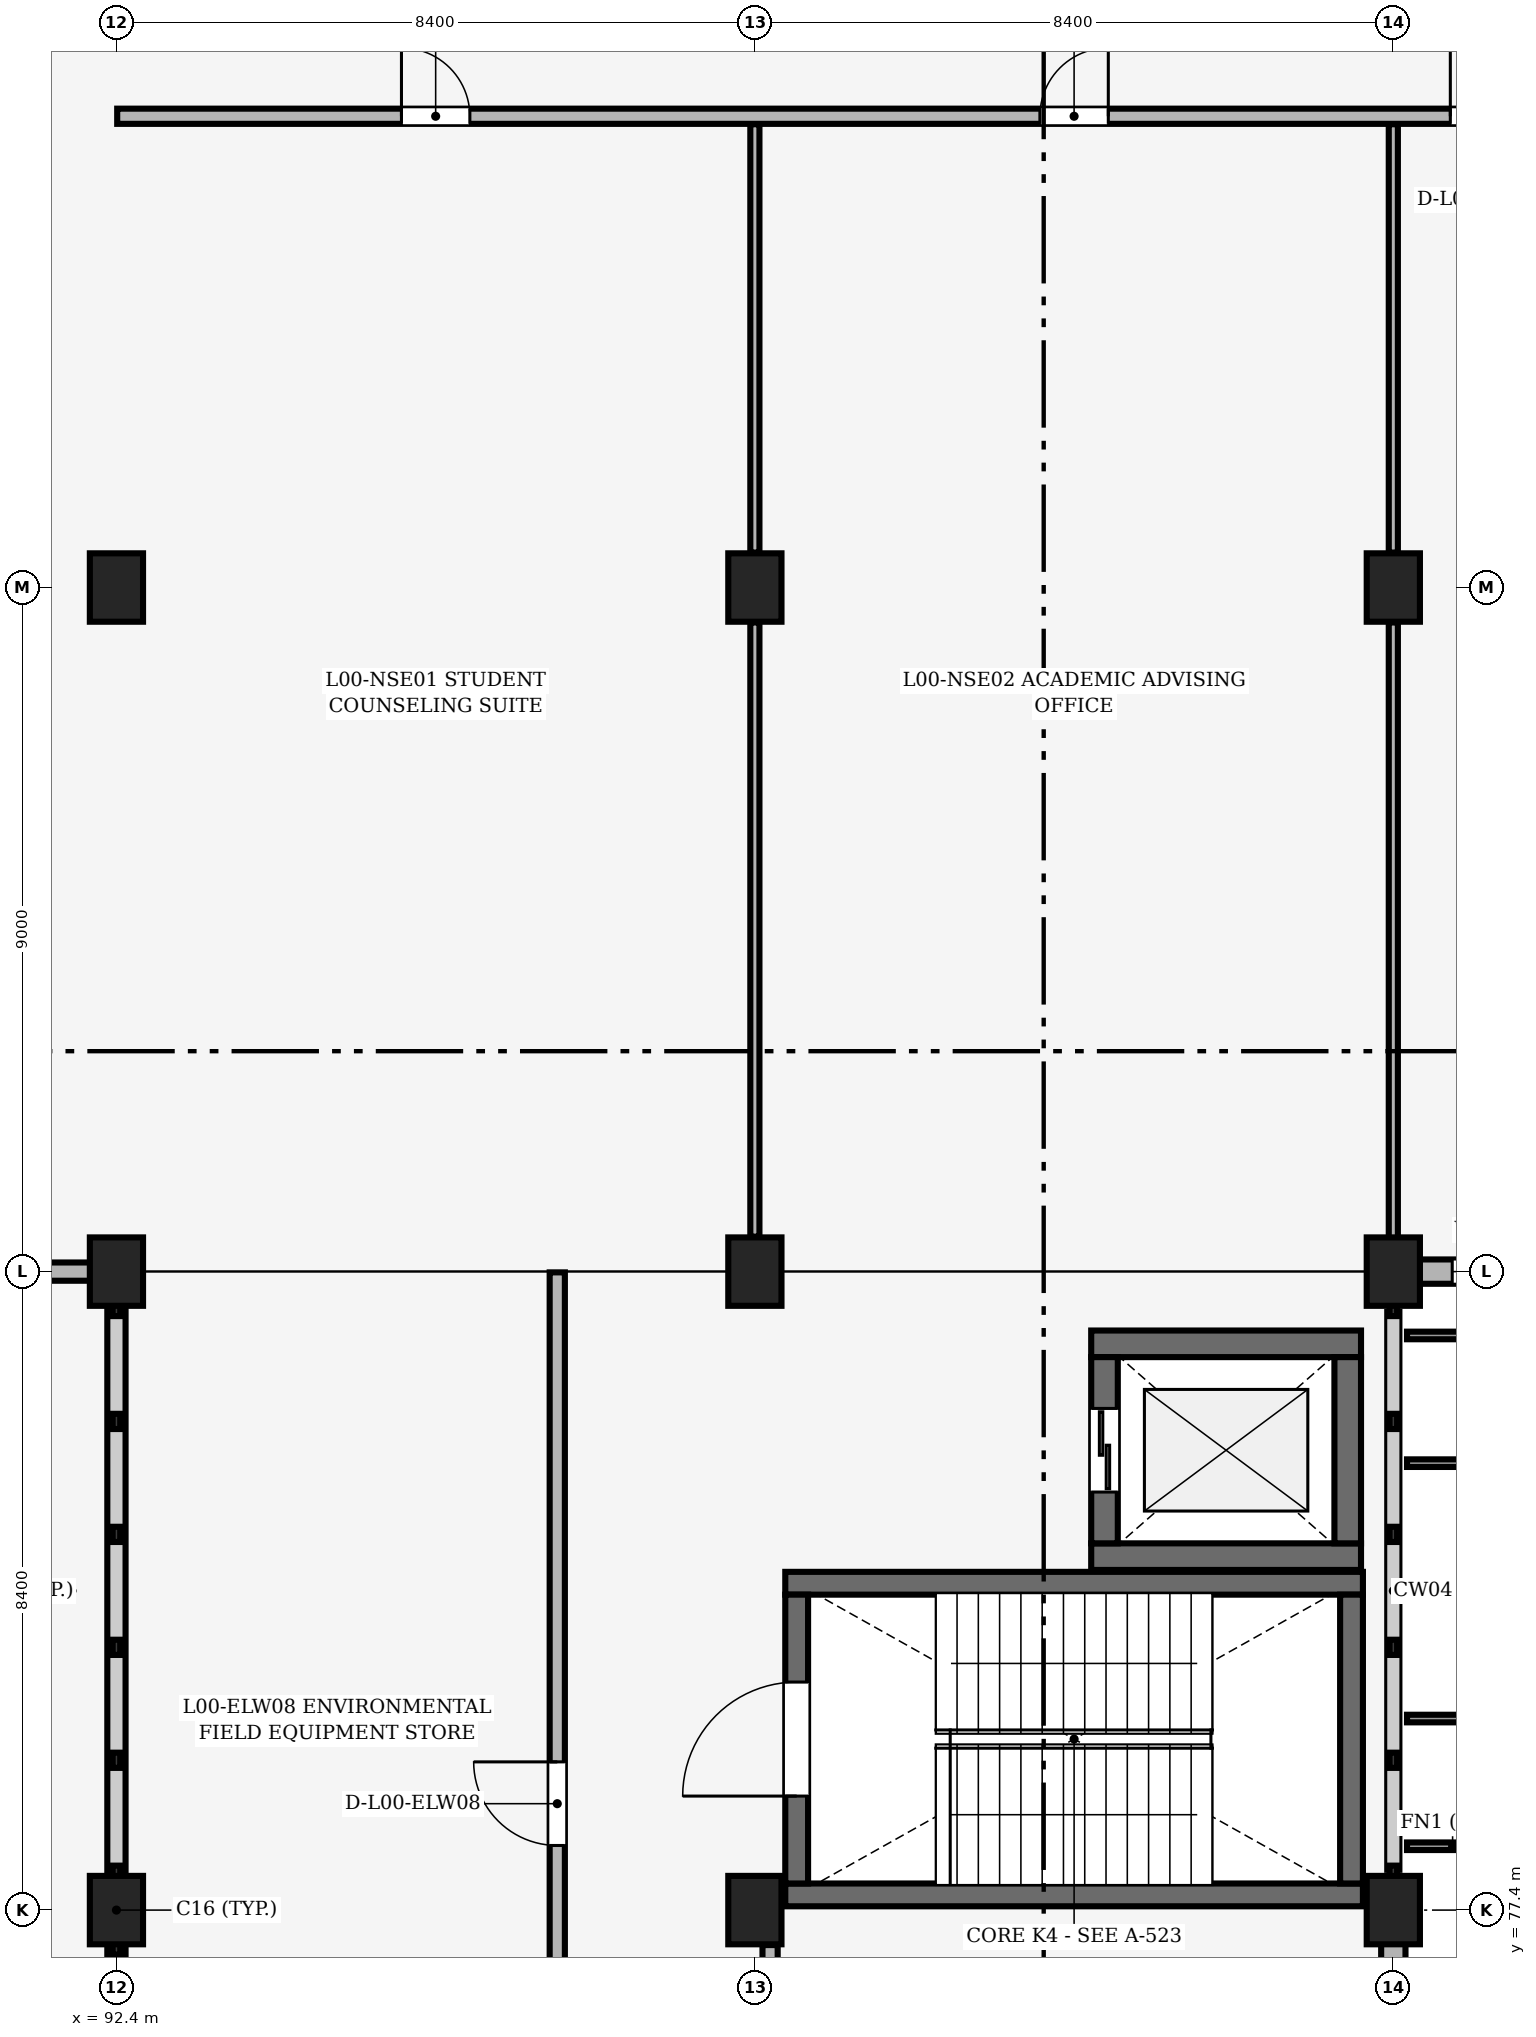
"""IFC4 building model, lengths in metres.
Left out: names, types, materials, properties, quantities, classifications, styles, units other than length and angle.
Written with IfcOpenShell. Run it as: python <this file> out.ifc"""

import sys

from ifc_helpers import new_model, si_unit, direction, frame, frame_2d, origin, origin_2d, place, context, subcontext, project, spatial, rectangle, extrude, element, fill, save


model = new_model("IFC4")
c1 = context("Model", 3, precision=1e-05, world=origin(), true_north=direction((0.0, 1.0)))
c2 = subcontext(c1, "Body", "Model", "MODEL_VIEW")
j1 = project(units=[si_unit("LENGTHUNIT", "METRE"), si_unit("PLANEANGLEUNIT", "RADIAN")], contexts=[c1])
p1 = place(None, origin())
s1 = spatial("IfcSite", under=j1, at=p1, CompositionType="ELEMENT")
p2 = place(p1, origin())
s2 = spatial("IfcBuilding", under=s1, at=p2, CompositionType="ELEMENT")
p3 = place(p2, origin())
s3 = spatial("IfcBuildingStorey", under=s2, at=p3, CompositionType="ELEMENT", Elevation=0.0)
for number, where, z_axis, x_axis in (
    (1, (92.4, 77.4, 0.0), (0.0, 0.0, 1.0), (1.0, 0.0, 0.0)),
    (2, (92.4, 85.8, 0.0), (0.0, 0.0, 1.0), (1.0, 0.0, 0.0)),
    (3, (92.4, 94.8, 0.0), (0.0, 0.0, 1.0), (1.0, 0.0, 0.0)),
    (4, (100.8, 77.4, 0.0), (0.0, 0.0, 1.0), (1.0, 0.0, 0.0)),
    (5, (100.8, 85.8, 0.0), (0.0, 0.0, 1.0), (1.0, 0.0, 0.0)),
    (6, (100.8, 94.8, 0.0), (0.0, 0.0, 1.0), (1.0, 0.0, 0.0)),
    (7, (109.2, 77.4, 0.0), (0.0, 0.0, 1.0), (1.0, 0.0, 0.0)),
    (8, (109.2, 85.8, 0.0), (0.0, 0.0, 1.0), (1.0, 0.0, 0.0)),
    (9, (109.2, 94.8, 0.0), (0.0, 0.0, 1.0), (1.0, 0.0, 0.0)),
):
    element("IfcColumn", number, at=place(p3, frame(where, z_axis=z_axis, x_axis=x_axis)), inside=s3, PredefinedType="COLUMN", context=c2, shape_type="SweptSolid", body=[
        extrude(rectangle(XDim=0.7, YDim=0.9, at=origin_2d()), origin(), (0.0, 0.0, 1.0), 4.8),
    ])
p4 = place(p3, frame((109.2, 69.425, 0.0), z_axis=(0.0, 0.0, 1.0), x_axis=(0.0, 1.0, 0.0)))
e10 = element("IfcWall", 10, at=p4, inside=s3, PredefinedType="SOLIDWALL", context=c2, shape_type="SweptSolid", body=[
    extrude(rectangle(XDim=7.55, YDim=0.32, at=frame_2d((3.775, 0.0))), origin(), (0.0, 0.0, 1.0), 3.89),
])
p5 = place(p4, frame((4.6, 0.0, 0.0), z_axis=(0.0, 0.0, 1.0), x_axis=(-1.0, 0.0, 0.0)))
e11 = element("IfcOpeningElement", 11, at=p5, cuts=e10, PredefinedType="OPENING", context=c2, shape_type="SweptSolid", body=[
    extrude(rectangle(XDim=1.65, YDim=2.25, at=frame_2d((0.825, 1.125))), frame((0.0, 0.17, 0.0), z_axis=(0.0, -1.0, 0.0), x_axis=(1.0, 0.0, 0.0)), (0.0, 0.0, 1.0), 0.34),
])
p6 = place(p4, frame((0.45, 0.0, 0.95)))
e12 = element("IfcOpeningElement", 12, at=p6, cuts=e10, PredefinedType="OPENING", context=c2, shape_type="SweptSolid", body=[
    extrude(rectangle(XDim=1.68, YDim=2.1, at=frame_2d((0.84, 1.05))), frame((0.0, 0.17, 0.0), z_axis=(0.0, -1.0, 0.0), x_axis=(1.0, 0.0, 0.0)), (0.0, 0.0, 1.0), 0.34),
])
p7 = place(p3, frame((109.525, 85.8, 0.0), z_axis=(0.0, 0.0, 1.0), x_axis=(1.0, 0.0, 0.0)))
e13 = element("IfcWall", 13, at=p7, inside=s3, PredefinedType="SOLIDWALL", context=c2, shape_type="SweptSolid", body=[
    extrude(rectangle(XDim=7.85, YDim=0.32, at=frame_2d((3.925, 0.0))), origin(), (0.0, 0.0, 1.0), 3.92),
])
p8 = place(p7, frame((0.45, 0.0, 0.9)))
e14 = element("IfcOpeningElement", 14, at=p8, cuts=e13, PredefinedType="OPENING", context=c2, shape_type="SweptSolid", body=[
    extrude(rectangle(XDim=1.68, YDim=2.4, at=frame_2d((0.84, 1.2))), frame((0.0, 0.17, 0.0), z_axis=(0.0, -1.0, 0.0), x_axis=(1.0, 0.0, 0.0)), (0.0, 0.0, 1.0), 0.34),
])
p9 = place(p7, frame((6.2, 0.0, 0.9)))
e15 = element("IfcOpeningElement", 15, at=p9, cuts=e13, PredefinedType="OPENING", context=c2, shape_type="SweptSolid", body=[
    extrude(rectangle(XDim=1.2, YDim=1.5, at=frame_2d((0.6, 0.75))), frame((0.0, 0.17, 0.0), z_axis=(0.0, -1.0, 0.0), x_axis=(1.0, 0.0, 0.0)), (0.0, 0.0, 1.0), 0.34),
])
p10 = place(p3, frame((84.229, 85.8, 0.0), z_axis=(0.0, 0.0, 1.0), x_axis=(1.0, 0.0, 0.0)))
e16 = element("IfcWall", 16, at=p10, inside=s3, PredefinedType="SOLIDWALL", context=c2, shape_type="SweptSolid", body=[
    extrude(rectangle(XDim=7.846, YDim=0.24, at=frame_2d((3.923, 0.0))), origin(), (0.0, 0.0, 1.0), 3.52),
])
p11 = place(p10, frame((4.823, 0.0, 0.0), z_axis=(0.0, 0.0, 1.0), x_axis=(-1.0, 0.0, 0.0)))
e17 = element("IfcOpeningElement", 17, at=p11, cuts=e16, PredefinedType="OPENING", context=c2, shape_type="SweptSolid", body=[
    extrude(rectangle(XDim=1.8, YDim=2.35, at=frame_2d((0.9, 1.175))), frame((0.0, 0.13, 0.0), z_axis=(0.0, -1.0, 0.0), x_axis=(1.0, 0.0, 0.0)), (0.0, 0.0, 1.0), 0.26),
])
p12 = place(p10, frame((0.45, 0.0, 0.95)))
e18 = element("IfcOpeningElement", 18, at=p12, cuts=e16, PredefinedType="OPENING", context=c2, shape_type="SweptSolid", body=[
    extrude(rectangle(XDim=1.68, YDim=1.8, at=frame_2d((0.84, 0.9))), frame((0.0, 0.13, 0.0), z_axis=(0.0, -1.0, 0.0), x_axis=(1.0, 0.0, 0.0)), (0.0, 0.0, 1.0), 0.26),
])
for number, where, z_axis, x_axis in (
    (19, (92.4, 69.425, 0.0), (0.0, 0.0, 1.0), (0.0, 1.0, 0.0)),
    (20, (92.4, 77.825, 0.0), (0.0, 0.0, 1.0), (0.0, 1.0, 0.0)),
):
    element("IfcWall", number, at=place(p3, frame(where, z_axis=z_axis, x_axis=x_axis)), inside=s3, PredefinedType="SOLIDWALL", context=c2, shape_type="SweptSolid", body=[
        extrude(rectangle(XDim=7.55, YDim=0.24, at=frame_2d((3.775, 0.0))), origin(), (0.0, 0.0, 1.0), 1.15),
    ])
for number, where, z_axis, x_axis in (
    (21, (101.2, 77.6, 0.0), (0.0, 0.0, 1.0), (1.0, 0.0, 0.0)),
    (22, (101.2, 81.7, 0.0), (0.0, 0.0, 1.0), (1.0, 0.0, 0.0)),
):
    element("IfcWall", number, at=place(p3, frame(where, z_axis=z_axis, x_axis=x_axis)), inside=s3, PredefinedType="SHEAR", context=c2, shape_type="SweptSolid", body=[
        extrude(rectangle(XDim=7.6, YDim=0.3, at=frame_2d((3.8, 0.0))), origin(), (0.0, 0.0, 1.0), 4.625),
    ])
p13 = place(p3, frame((101.35, 77.75, 0.0), z_axis=(0.0, 0.0, 1.0), x_axis=(0.0, 1.0, 0.0)))
e23 = element("IfcWall", 23, at=p13, inside=s3, PredefinedType="SHEAR", context=c2, shape_type="SweptSolid", body=[
    extrude(rectangle(XDim=3.8, YDim=0.3, at=frame_2d((1.9, 0.0))), origin(), (0.0, 0.0, 1.0), 4.625),
])
p14 = place(p13, frame((1.15, 0.0, 0.0)))
e24 = element("IfcOpeningElement", 24, at=p14, cuts=e23, PredefinedType="OPENING", context=c2, shape_type="SweptSolid", body=[
    extrude(rectangle(XDim=1.5, YDim=2.2, at=frame_2d((0.75, 1.1))), frame((0.0, 0.16, 0.0), z_axis=(0.0, -1.0, 0.0), x_axis=(1.0, 0.0, 0.0)), (0.0, 0.0, 1.0), 0.32),
])
p15 = place(p3, frame((108.65, 77.75, 0.0), z_axis=(0.0, 0.0, 1.0), x_axis=(0.0, 1.0, 0.0)))
e25 = element("IfcWall", 25, at=p15, inside=s3, PredefinedType="SHEAR", context=c2, shape_type="SweptSolid", body=[
    extrude(rectangle(XDim=3.8, YDim=0.3, at=frame_2d((1.9, 0.0))), origin(), (0.0, 0.0, 1.0), 4.625),
])
for number, where, z_axis, x_axis in (
    (26, (105.225, 82.05, 0.0), (0.0, 0.0, 1.0), (1.0, 0.0, 0.0)),
    (27, (105.225, 84.85, 0.0), (0.0, 0.0, 1.0), (1.0, 0.0, 0.0)),
):
    element("IfcWall", number, at=place(p3, frame(where, z_axis=z_axis, x_axis=x_axis)), inside=s3, PredefinedType="SHEAR", context=c2, shape_type="SweptSolid", body=[
        extrude(rectangle(XDim=3.55, YDim=0.35, at=frame_2d((1.775, 0.0))), origin(), (0.0, 0.0, 1.0), 4.52),
    ])
p16 = place(p3, frame((105.4, 82.225, 0.0), z_axis=(0.0, 0.0, 1.0), x_axis=(0.0, 1.0, 0.0)))
e28 = element("IfcWall", 28, at=p16, inside=s3, PredefinedType="SHEAR", context=c2, shape_type="SweptSolid", body=[
    extrude(rectangle(XDim=2.45, YDim=0.35, at=frame_2d((1.225, 0.0))), origin(), (0.0, 0.0, 1.0), 4.52),
])
p17 = place(p16, frame((0.675, 0.0, 0.0)))
e29 = element("IfcOpeningElement", 29, at=p17, cuts=e28, PredefinedType="OPENING", context=c2, shape_type="SweptSolid", body=[
    extrude(rectangle(XDim=1.1, YDim=2.2, at=frame_2d((0.55, 1.1))), frame((0.0, 0.185, 0.0), z_axis=(0.0, -1.0, 0.0), x_axis=(1.0, 0.0, 0.0)), (0.0, 0.0, 1.0), 0.37),
])
p18 = place(p3, frame((108.6, 82.225, 0.0), z_axis=(0.0, 0.0, 1.0), x_axis=(0.0, 1.0, 0.0)))
e30 = element("IfcWall", 30, at=p18, inside=s3, PredefinedType="SHEAR", context=c2, shape_type="SweptSolid", body=[
    extrude(rectangle(XDim=2.45, YDim=0.35, at=frame_2d((1.225, 0.0))), origin(), (0.0, 0.0, 1.0), 4.52),
])
p19 = place(p3, frame((100.8, 86.26, 0.0), z_axis=(0.0, 0.0, 1.0), x_axis=(0.0, 1.0, 0.0)))
e31 = element("IfcWall", 31, at=p19, inside=s3, PredefinedType="PARTITIONING", context=c2, shape_type="SweptSolid", body=[
    extrude(rectangle(XDim=8.08, YDim=0.12, at=frame_2d((4.04, 0.0))), origin(), (0.0, 0.0, 1.0), 3.67),
])
p20 = place(p3, frame((100.8, 95.26, 0.0), z_axis=(0.0, 0.0, 1.0), x_axis=(0.0, 1.0, 0.0)))
e32 = element("IfcWall", 32, at=p20, inside=s3, PredefinedType="PARTITIONING", context=c2, shape_type="SweptSolid", body=[
    extrude(rectangle(XDim=5.635, YDim=0.12, at=frame_2d((2.817, 0.0))), origin(), (0.0, 0.0, 1.0), 3.62),
])
p21 = place(p3, frame((109.2, 85.965, 0.0), z_axis=(0.0, 0.0, 1.0), x_axis=(0.0, 1.0, 0.0)))
e33 = element("IfcWall", 33, at=p21, inside=s3, PredefinedType="PARTITIONING", context=c2, shape_type="SweptSolid", body=[
    extrude(rectangle(XDim=8.375, YDim=0.12, at=frame_2d((4.188, 0.0))), origin(), (0.0, 0.0, 1.0), 3.77),
])
p22 = place(p3, frame((109.2, 95.26, 0.0), z_axis=(0.0, 0.0, 1.0), x_axis=(0.0, 1.0, 0.0)))
e34 = element("IfcWall", 34, at=p22, inside=s3, PredefinedType="PARTITIONING", context=c2, shape_type="SweptSolid", body=[
    extrude(rectangle(XDim=5.635, YDim=0.12, at=frame_2d((2.817, 0.0))), origin(), (0.0, 0.0, 1.0), 3.72),
])
p23 = place(p3, frame((92.41, 101.0, 0.0), z_axis=(0.0, 0.0, 1.0), x_axis=(1.0, 0.0, 0.0)))
e35 = element("IfcWall", 35, at=p23, inside=s3, PredefinedType="PARTITIONING", context=c2, shape_type="SweptSolid", body=[
    extrude(rectangle(XDim=24.995, YDim=0.2, at=frame_2d((12.498, 0.0))), origin(), (0.0, 0.0, 1.0), 4.04),
])
p24 = place(p23, frame((3.74, 0.0, 0.0)))
e36 = element("IfcOpeningElement", 36, at=p24, cuts=e35, PredefinedType="OPENING", context=c2, shape_type="SweptSolid", body=[
    extrude(rectangle(XDim=0.9, YDim=2.1, at=frame_2d((0.45, 1.05))), frame((0.0, 0.11, 0.0), z_axis=(0.0, -1.0, 0.0), x_axis=(1.0, 0.0, 0.0)), (0.0, 0.0, 1.0), 0.22),
])
p25 = place(p23, frame((12.14, 0.0, 0.0)))
e37 = element("IfcOpeningElement", 37, at=p25, cuts=e35, PredefinedType="OPENING", context=c2, shape_type="SweptSolid", body=[
    extrude(rectangle(XDim=0.9, YDim=2.1, at=frame_2d((0.45, 1.05))), frame((0.0, 0.11, 0.0), z_axis=(0.0, -1.0, 0.0), x_axis=(1.0, 0.0, 0.0)), (0.0, 0.0, 1.0), 0.22),
])
p26 = place(p23, frame((17.54, 0.0, 0.0)))
e38 = element("IfcOpeningElement", 38, at=p26, cuts=e35, PredefinedType="OPENING", context=c2, shape_type="SweptSolid", body=[
    extrude(rectangle(XDim=0.9, YDim=2.1, at=frame_2d((0.45, 1.05))), frame((0.0, 0.11, 0.0), z_axis=(0.0, -1.0, 0.0), x_axis=(1.0, 0.0, 0.0)), (0.0, 0.0, 1.0), 0.22),
])
p27 = place(p3, frame((98.2, 18.01, 0.0), z_axis=(0.0, 0.0, 1.0), x_axis=(0.0, 1.0, 0.0)))
e39 = element("IfcWall", 39, at=p27, inside=s3, PredefinedType="PARTITIONING", context=c2, shape_type="SweptSolid", body=[
    extrude(rectangle(XDim=67.78, YDim=0.2, at=frame_2d((33.89, 0.0))), origin(), (0.0, 0.0, 1.0), 4.5),
])
p28 = place(p27, frame((3.24, 0.0, 0.0)))
e40 = element("IfcOpeningElement", 40, at=p28, cuts=e39, PredefinedType="OPENING", context=c2, shape_type="SweptSolid", body=[
    extrude(rectangle(XDim=1.7, YDim=2.25, at=frame_2d((0.85, 1.125))), frame((0.0, 0.11, 0.0), z_axis=(0.0, -1.0, 0.0), x_axis=(1.0, 0.0, 0.0)), (0.0, 0.0, 1.0), 0.22),
])
p29 = place(p27, frame((12.965, 0.0, 0.0)))
e41 = element("IfcOpeningElement", 41, at=p29, cuts=e39, PredefinedType="OPENING", context=c2, shape_type="SweptSolid", body=[
    extrude(rectangle(XDim=1.05, YDim=2.2, at=frame_2d((0.525, 1.1))), frame((0.0, 0.11, 0.0), z_axis=(0.0, -1.0, 0.0), x_axis=(1.0, 0.0, 0.0)), (0.0, 0.0, 1.0), 0.22),
])
p30 = place(p27, frame((21.94, 0.0, 0.0)))
e42 = element("IfcOpeningElement", 42, at=p30, cuts=e39, PredefinedType="OPENING", context=c2, shape_type="SweptSolid", body=[
    extrude(rectangle(XDim=1.1, YDim=2.15, at=frame_2d((0.55, 1.075))), frame((0.0, 0.11, 0.0), z_axis=(0.0, -1.0, 0.0), x_axis=(1.0, 0.0, 0.0)), (0.0, 0.0, 1.0), 0.22),
])
p31 = place(p27, frame((28.515, 0.0, 0.0)))
e43 = element("IfcOpeningElement", 43, at=p31, cuts=e39, PredefinedType="OPENING", context=c2, shape_type="SweptSolid", body=[
    extrude(rectangle(XDim=0.95, YDim=2.2, at=frame_2d((0.475, 1.1))), frame((0.0, 0.11, 0.0), z_axis=(0.0, -1.0, 0.0), x_axis=(1.0, 0.0, 0.0)), (0.0, 0.0, 1.0), 0.22),
])
p32 = place(p27, frame((34.115, 0.0, 0.0)))
e44 = element("IfcOpeningElement", 44, at=p32, cuts=e39, PredefinedType="OPENING", context=c2, shape_type="SweptSolid", body=[
    extrude(rectangle(XDim=0.95, YDim=2.2, at=frame_2d((0.475, 1.1))), frame((0.0, 0.11, 0.0), z_axis=(0.0, -1.0, 0.0), x_axis=(1.0, 0.0, 0.0)), (0.0, 0.0, 1.0), 0.22),
])
p33 = place(p27, frame((39.015, 0.0, 0.0)))
e45 = element("IfcOpeningElement", 45, at=p33, cuts=e39, PredefinedType="OPENING", context=c2, shape_type="SweptSolid", body=[
    extrude(rectangle(XDim=0.95, YDim=2.1, at=frame_2d((0.475, 1.05))), frame((0.0, 0.11, 0.0), z_axis=(0.0, -1.0, 0.0), x_axis=(1.0, 0.0, 0.0)), (0.0, 0.0, 1.0), 0.22),
])
p34 = place(p27, frame((47.19, 0.0, 0.0)))
e46 = element("IfcOpeningElement", 46, at=p34, cuts=e39, PredefinedType="OPENING", context=c2, shape_type="SweptSolid", body=[
    extrude(rectangle(XDim=1.0, YDim=2.25, at=frame_2d((0.5, 1.125))), frame((0.0, 0.11, 0.0), z_axis=(0.0, -1.0, 0.0), x_axis=(1.0, 0.0, 0.0)), (0.0, 0.0, 1.0), 0.22),
])
p35 = place(p27, frame((60.24, 0.0, 0.0)))
e47 = element("IfcOpeningElement", 47, at=p35, cuts=e39, PredefinedType="OPENING", context=c2, shape_type="SweptSolid", body=[
    extrude(rectangle(XDim=1.1, YDim=2.15, at=frame_2d((0.55, 1.075))), frame((0.0, 0.11, 0.0), z_axis=(0.0, -1.0, 0.0), x_axis=(1.0, 0.0, 0.0)), (0.0, 0.0, 1.0), 0.22),
])
p36 = place(p3, frame((101.0, 74.51, 0.0), z_axis=(0.0, 0.0, 1.0), x_axis=(0.0, 1.0, 0.0)))
e48 = element("IfcWall", 48, at=p36, inside=s3, PredefinedType="PARTITIONING", context=c2, shape_type="SweptSolid", body=[
    extrude(rectangle(XDim=2.43, YDim=0.2, at=frame_2d((1.215, 0.0))), origin(), (0.0, 0.0, 1.0), 3.74),
])
p37 = place(p36, frame((0.59, 0.0, 0.0)))
e49 = element("IfcOpeningElement", 49, at=p37, cuts=e48, PredefinedType="OPENING", context=c2, shape_type="SweptSolid", body=[
    extrude(rectangle(XDim=1.1, YDim=2.15, at=frame_2d((0.55, 1.075))), frame((0.0, 0.11, 0.0), z_axis=(0.0, -1.0, 0.0), x_axis=(1.0, 0.0, 0.0)), (0.0, 0.0, 1.0), 0.22),
])
p38 = place(p8, origin())
e50 = element("IfcWindow", 50, at=p38, inside=s3, PartitioningType="SINGLE_PANEL", PredefinedType="WINDOW", context=c2, shape_type="SweptSolid", body=[
    extrude(rectangle(XDim=1.68, YDim=2.4, at=frame_2d((0.84, 1.2))), frame((0.0, 0.03, 0.0), z_axis=(0.0, -1.0, 0.0), x_axis=(1.0, 0.0, 0.0)), (0.0, 0.0, 1.0), 0.06),
])
fill(e14, e50)
p39 = place(p14, origin())
e51 = element("IfcDoor", 51, at=p39, inside=s3, OperationType="DOUBLE_DOOR_SINGLE_SWING", PredefinedType="DOOR", context=c2, shape_type="SweptSolid", body=[
    extrude(rectangle(XDim=1.5, YDim=2.2, at=frame_2d((0.75, 1.1))), frame((0.0, 0.025, 0.0), z_axis=(0.0, -1.0, 0.0), x_axis=(1.0, 0.0, 0.0)), (0.0, 0.0, 1.0), 0.05),
])
fill(e24, e51)
p40 = place(p17, origin())
e52 = element("IfcDoor", 52, at=p40, inside=s3, OperationType="DOUBLE_DOOR_SLIDING", PredefinedType="DOOR", context=c2, shape_type="SweptSolid", body=[
    extrude(rectangle(XDim=1.1, YDim=2.2, at=frame_2d((0.55, 1.1))), frame((0.0, 0.025, 0.0), z_axis=(0.0, -1.0, 0.0), x_axis=(1.0, 0.0, 0.0)), (0.0, 0.0, 1.0), 0.05),
])
fill(e29, e52)
p41 = place(p24, origin())
e53 = element("IfcDoor", 53, at=p41, inside=s3, OperationType="SINGLE_SWING_LEFT", PredefinedType="DOOR", context=c2, shape_type="SweptSolid", body=[
    extrude(rectangle(XDim=0.9, YDim=2.1, at=frame_2d((0.45, 1.05))), frame((0.0, 0.025, 0.0), z_axis=(0.0, -1.0, 0.0), x_axis=(1.0, 0.0, 0.0)), (0.0, 0.0, 1.0), 0.05),
])
fill(e36, e53)
p42 = place(p25, origin())
e54 = element("IfcDoor", 54, at=p42, inside=s3, OperationType="SINGLE_SWING_RIGHT", PredefinedType="DOOR", context=c2, shape_type="SweptSolid", body=[
    extrude(rectangle(XDim=0.9, YDim=2.1, at=frame_2d((0.45, 1.05))), frame((0.0, 0.025, 0.0), z_axis=(0.0, -1.0, 0.0), x_axis=(1.0, 0.0, 0.0)), (0.0, 0.0, 1.0), 0.05),
])
fill(e37, e54)
p43 = place(p26, origin())
e55 = element("IfcDoor", 55, at=p43, inside=s3, OperationType="SINGLE_SWING_LEFT", PredefinedType="DOOR", context=c2, shape_type="SweptSolid", body=[
    extrude(rectangle(XDim=0.9, YDim=2.1, at=frame_2d((0.45, 1.05))), frame((0.0, 0.025, 0.0), z_axis=(0.0, -1.0, 0.0), x_axis=(1.0, 0.0, 0.0)), (0.0, 0.0, 1.0), 0.05),
])
fill(e38, e55)
p44 = place(p35, origin())
e56 = element("IfcDoor", 56, at=p44, inside=s3, OperationType="SINGLE_SWING_RIGHT", PredefinedType="DOOR", context=c2, shape_type="SweptSolid", body=[
    extrude(rectangle(XDim=1.1, YDim=2.15, at=frame_2d((0.55, 1.075))), frame((0.0, 0.025, 0.0), z_axis=(0.0, -1.0, 0.0), x_axis=(1.0, 0.0, 0.0)), (0.0, 0.0, 1.0), 0.05),
])
fill(e47, e56)
save(model, sys.argv[1])
